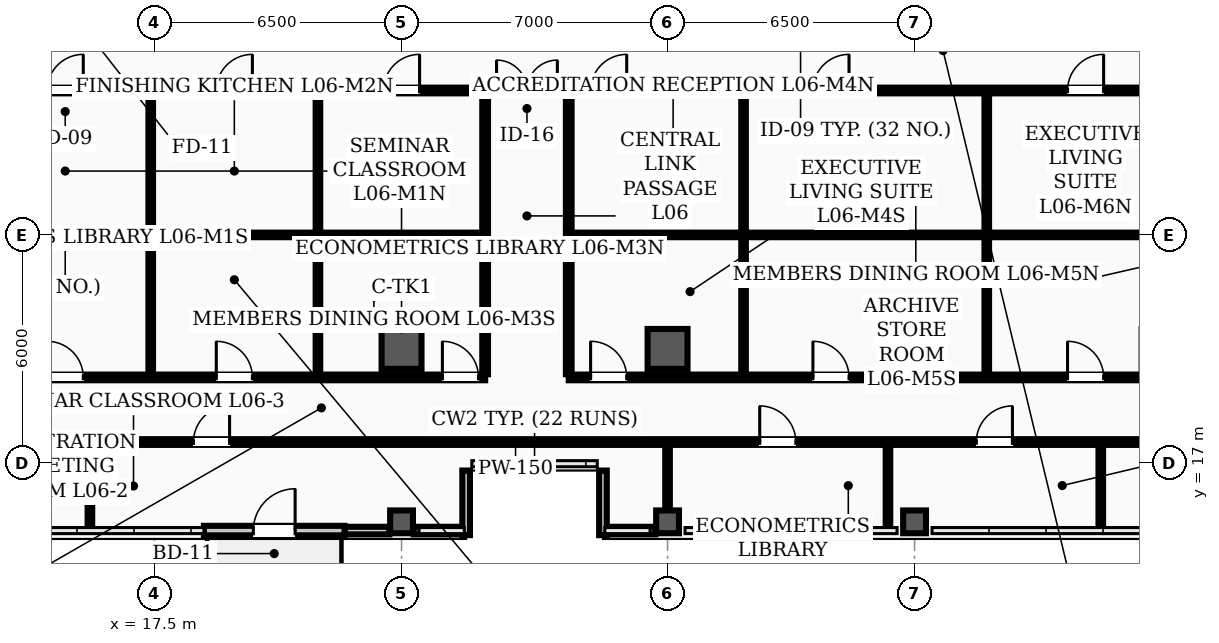
"""IFC4 building model, lengths in metres.
Left out: names, types, materials, properties, quantities, classifications, styles, units other than length and angle.
Written with IfcOpenShell. Run it as: python <this file> out.ifc"""

import sys

from ifc_helpers import new_model, si_unit, direction, frame, frame_2d, origin, origin_2d, place, context, subcontext, project, spatial, rectangle, hollow_rectangle, extrude, element, fill, save


model = new_model("IFC4")
c1 = context("Model", 3, precision=1e-05, world=origin(), true_north=direction((0.0, 1.0)))
c2 = subcontext(c1, "Body", "Model", "MODEL_VIEW")
j1 = project(units=[si_unit("LENGTHUNIT", "METRE"), si_unit("PLANEANGLEUNIT", "RADIAN")], contexts=[c1])
p1 = place(None, origin())
s1 = spatial("IfcSite", under=j1, at=p1, CompositionType="ELEMENT")
p2 = place(p1, origin())
s2 = spatial("IfcBuilding", under=s1, at=p2, CompositionType="ELEMENT")
p3 = place(p2, frame((0.0, 0.0, 26.5)))
s3 = spatial("IfcBuildingStorey", under=s2, at=p3, CompositionType="ELEMENT", Elevation=26.5)
for number, where, z_axis, x_axis in (
    (1, (24.0, 20.0, 0.0), (0.0, 0.0, 1.0), (1.0, 0.0, 0.0)),
    (2, (31.0, 20.0, 0.0), (0.0, 0.0, 1.0), (1.0, 0.0, 0.0)),
    (3, (37.5, 20.0, 0.0), (0.0, 0.0, 1.0), (1.0, 0.0, 0.0)),
):
    element("IfcColumn", number, at=place(p3, frame(where, z_axis=z_axis, x_axis=x_axis)), inside=s3, PredefinedType="COLUMN", context=c2, shape_type="SweptSolid", body=[
        extrude(hollow_rectangle(XDim=1.05, YDim=1.05, WallThickness=0.038, InnerFilletRadius=0.019, OuterFilletRadius=0.057, at=origin_2d()), origin(), (0.0, 0.0, 1.0), 3.9),
    ])
for number, where, z_axis, x_axis in (
    (4, (24.0, 15.45, 0.0), (0.0, 0.0, 1.0), (1.0, 0.0, 0.0)),
    (5, (31.0, 15.45, 0.0), (0.0, 0.0, 1.0), (1.0, 0.0, 0.0)),
    (6, (37.5, 15.45, 0.0), (0.0, 0.0, 1.0), (1.0, 0.0, 0.0)),
):
    element("IfcColumn", number, at=place(p3, frame(where, z_axis=z_axis, x_axis=x_axis)), inside=s3, PredefinedType="COLUMN", context=c2, shape_type="SweptSolid", body=[
        extrude(hollow_rectangle(XDim=0.6, YDim=0.6, WallThickness=0.026, InnerFilletRadius=0.013, OuterFilletRadius=0.039, at=origin_2d()), origin(), (0.0, 0.0, 1.0), 3.9),
    ])
p4 = place(p3, frame((22.5, 15.22, 0.0), z_axis=(0.0, 0.0, 1.0), x_axis=(1.0, 0.0, 0.0)))
e7 = element("IfcWall", 7, at=p4, inside=s3, PredefinedType="PARAPET", context=c2, shape_type="SweptSolid", body=[
    extrude(rectangle(XDim=1.18, YDim=0.2, at=frame_2d((0.59, 0.0))), origin(), (0.0, 0.0, 1.0), 1.2),
])
for number, where, z_axis, x_axis in (
    (8, (24.32, 15.22, 0.0), (0.0, 0.0, 1.0), (1.0, 0.0, 0.0)),
    (9, (29.35, 15.22, 0.0), (0.0, 0.0, 1.0), (1.0, 0.0, 0.0)),
):
    element("IfcWall", number, at=place(p3, frame(where, z_axis=z_axis, x_axis=x_axis)), inside=s3, PredefinedType="PARAPET", context=c2, shape_type="SweptSolid", body=[
        extrude(rectangle(XDim=1.33, YDim=0.2, at=frame_2d((0.665, 0.0))), origin(), (0.0, 0.0, 1.0), 1.2),
    ])
for number, where, z_axis, x_axis in (
    (10, (25.7, 15.1, 0.0), (0.0, 0.0, 1.0), (0.0, 1.0, 0.0)),
    (11, (29.3, 16.8, 0.0), (0.0, 0.0, 1.0), (0.0, -1.0, 0.0)),
):
    element("IfcWall", number, at=place(p3, frame(where, z_axis=z_axis, x_axis=x_axis)), inside=s3, PredefinedType="PARAPET", context=c2, shape_type="SweptSolid", body=[
        extrude(rectangle(XDim=1.7, YDim=0.2, at=frame_2d((0.85, 0.0))), origin(), (0.0, 0.0, 1.0), 1.2),
    ])
p5 = place(p3, frame((18.8, 15.22, 0.0), z_axis=(0.0, 0.0, 1.0), x_axis=(1.0, 0.0, 0.0)))
e12 = element("IfcWall", 12, at=p5, inside=s3, PredefinedType="STANDARD", context=c2, shape_type="SweptSolid", body=[
    extrude(rectangle(XDim=3.7, YDim=0.25, at=frame_2d((1.85, 0.0))), origin(), (0.0, 0.0, 1.0), 3.18),
])
p6 = place(p5, frame((1.3, 0.0, 0.0)))
e13 = element("IfcOpeningElement", 13, at=p6, cuts=e12, PredefinedType="OPENING", context=c2, shape_type="SweptSolid", body=[
    extrude(rectangle(XDim=1.1, YDim=2.2, at=frame_2d((0.55, 1.1))), frame((0.0, 0.135, 0.0), z_axis=(0.0, -1.0, 0.0), x_axis=(1.0, 0.0, 0.0)), (0.0, 0.0, 1.0), 0.27),
])
p7 = place(p3, frame((12.9, 26.8, 0.0), z_axis=(0.0, 0.0, 1.0), x_axis=(1.0, 0.0, 0.0)))
e14 = element("IfcWall", 14, at=p7, inside=s3, PredefinedType="PARTITIONING", context=c2, shape_type="SweptSolid", body=[
    extrude(rectangle(XDim=31.7, YDim=0.15, at=frame_2d((15.85, 0.0))), origin(), (0.0, 0.0, 1.0), 3.1),
])
p8 = place(p7, frame((13.6, 0.0, 0.0)))
e15 = element("IfcOpeningElement", 15, at=p8, cuts=e14, PredefinedType="OPENING", context=c2, shape_type="SweptSolid", body=[
    extrude(rectangle(XDim=1.6, YDim=2.08, at=frame_2d((0.8, 1.04))), frame((0.0, 0.085, 0.0), z_axis=(0.0, -1.0, 0.0), x_axis=(1.0, 0.0, 0.0)), (0.0, 0.0, 1.0), 0.17),
])
p9 = place(p7, frame((1.775, 0.0, 0.0)))
e16 = element("IfcOpeningElement", 16, at=p9, cuts=e14, PredefinedType="OPENING", context=c2, shape_type="SweptSolid", body=[
    extrude(rectangle(XDim=0.95, YDim=2.08, at=frame_2d((0.475, 1.04))), frame((0.0, 0.085, 0.0), z_axis=(0.0, -1.0, 0.0), x_axis=(1.0, 0.0, 0.0)), (0.0, 0.0, 1.0), 0.17),
])
p10 = place(p7, frame((6.225, 0.0, 0.0)))
e17 = element("IfcOpeningElement", 17, at=p10, cuts=e14, PredefinedType="OPENING", context=c2, shape_type="SweptSolid", body=[
    extrude(rectangle(XDim=0.95, YDim=2.08, at=frame_2d((0.475, 1.04))), frame((0.0, 0.085, 0.0), z_axis=(0.0, -1.0, 0.0), x_axis=(1.0, 0.0, 0.0)), (0.0, 0.0, 1.0), 0.17),
])
p11 = place(p7, frame((10.625, 0.0, 0.0)))
e18 = element("IfcOpeningElement", 18, at=p11, cuts=e14, PredefinedType="OPENING", context=c2, shape_type="SweptSolid", body=[
    extrude(rectangle(XDim=0.95, YDim=2.08, at=frame_2d((0.475, 1.04))), frame((0.0, 0.085, 0.0), z_axis=(0.0, -1.0, 0.0), x_axis=(1.0, 0.0, 0.0)), (0.0, 0.0, 1.0), 0.17),
])
p12 = place(p7, frame((16.075, 0.0, 0.0)))
e19 = element("IfcOpeningElement", 19, at=p12, cuts=e14, PredefinedType="OPENING", context=c2, shape_type="SweptSolid", body=[
    extrude(rectangle(XDim=0.95, YDim=2.08, at=frame_2d((0.475, 1.04))), frame((0.0, 0.085, 0.0), z_axis=(0.0, -1.0, 0.0), x_axis=(1.0, 0.0, 0.0)), (0.0, 0.0, 1.0), 0.17),
])
p13 = place(p7, frame((21.925, 0.0, 0.0)))
e20 = element("IfcOpeningElement", 20, at=p13, cuts=e14, PredefinedType="OPENING", context=c2, shape_type="SweptSolid", body=[
    extrude(rectangle(XDim=0.95, YDim=2.08, at=frame_2d((0.475, 1.04))), frame((0.0, 0.085, 0.0), z_axis=(0.0, -1.0, 0.0), x_axis=(1.0, 0.0, 0.0)), (0.0, 0.0, 1.0), 0.17),
])
p14 = place(p7, frame((28.625, 0.0, 0.0)))
e21 = element("IfcOpeningElement", 21, at=p14, cuts=e14, PredefinedType="OPENING", context=c2, shape_type="SweptSolid", body=[
    extrude(rectangle(XDim=0.95, YDim=2.08, at=frame_2d((0.475, 1.04))), frame((0.0, 0.085, 0.0), z_axis=(0.0, -1.0, 0.0), x_axis=(1.0, 0.0, 0.0)), (0.0, 0.0, 1.0), 0.17),
])
p15 = place(p3, frame((4.66, 17.55, 0.0), z_axis=(0.0, 0.0, 1.0), x_axis=(1.0, 0.0, 0.0)))
e22 = element("IfcWall", 22, at=p15, inside=s3, PredefinedType="PARTITIONING", context=c2, shape_type="SweptSolid", body=[
    extrude(rectangle(XDim=44.68, YDim=0.15, at=frame_2d((22.34, 0.0))), origin(), (0.0, 0.0, 1.0), 3.1),
])
p16 = place(p15, frame((6.74, 0.0, 0.0)))
e23 = element("IfcOpeningElement", 23, at=p16, cuts=e22, PredefinedType="OPENING", context=c2, shape_type="SweptSolid", body=[
    extrude(rectangle(XDim=0.95, YDim=2.08, at=frame_2d((0.475, 1.04))), frame((0.0, 0.085, 0.0), z_axis=(0.0, -1.0, 0.0), x_axis=(1.0, 0.0, 0.0)), (0.0, 0.0, 1.0), 0.17),
])
p17 = place(p15, frame((13.865, 0.0, 0.0)))
e24 = element("IfcOpeningElement", 24, at=p17, cuts=e22, PredefinedType="OPENING", context=c2, shape_type="SweptSolid", body=[
    extrude(rectangle(XDim=0.95, YDim=2.08, at=frame_2d((0.475, 1.04))), frame((0.0, 0.085, 0.0), z_axis=(0.0, -1.0, 0.0), x_axis=(1.0, 0.0, 0.0)), (0.0, 0.0, 1.0), 0.17),
])
p18 = place(p15, frame((28.765, 0.0, 0.0)))
e25 = element("IfcOpeningElement", 25, at=p18, cuts=e22, PredefinedType="OPENING", context=c2, shape_type="SweptSolid", body=[
    extrude(rectangle(XDim=0.95, YDim=2.08, at=frame_2d((0.475, 1.04))), frame((0.0, 0.085, 0.0), z_axis=(0.0, -1.0, 0.0), x_axis=(1.0, 0.0, 0.0)), (0.0, 0.0, 1.0), 0.17),
])
p19 = place(p15, frame((34.465, 0.0, 0.0)))
e26 = element("IfcOpeningElement", 26, at=p19, cuts=e22, PredefinedType="OPENING", context=c2, shape_type="SweptSolid", body=[
    extrude(rectangle(XDim=0.95, YDim=2.08, at=frame_2d((0.475, 1.04))), frame((0.0, 0.085, 0.0), z_axis=(0.0, -1.0, 0.0), x_axis=(1.0, 0.0, 0.0)), (0.0, 0.0, 1.0), 0.17),
])
p20 = place(p15, frame((39.24, 0.0, 0.0)))
e27 = element("IfcOpeningElement", 27, at=p20, cuts=e22, PredefinedType="OPENING", context=c2, shape_type="SweptSolid", body=[
    extrude(rectangle(XDim=0.95, YDim=2.08, at=frame_2d((0.475, 1.04))), frame((0.0, 0.085, 0.0), z_axis=(0.0, -1.0, 0.0), x_axis=(1.0, 0.0, 0.0)), (0.0, 0.0, 1.0), 0.17),
])
p21 = place(p3, frame((12.9, 19.25, 0.0), z_axis=(0.0, 0.0, 1.0), x_axis=(1.0, 0.0, 0.0)))
e28 = element("IfcWall", 28, at=p21, inside=s3, PredefinedType="PARTITIONING", context=c2, shape_type="SweptSolid", body=[
    extrude(rectangle(XDim=13.3, YDim=0.15, at=frame_2d((6.65, 0.0))), origin(), (0.0, 0.0, 1.0), 3.1),
])
p22 = place(p21, frame((1.775, 0.0, 0.0)))
e29 = element("IfcOpeningElement", 29, at=p22, cuts=e28, PredefinedType="OPENING", context=c2, shape_type="SweptSolid", body=[
    extrude(rectangle(XDim=0.95, YDim=2.08, at=frame_2d((0.475, 1.04))), frame((0.0, 0.085, 0.0), z_axis=(0.0, -1.0, 0.0), x_axis=(1.0, 0.0, 0.0)), (0.0, 0.0, 1.0), 0.17),
])
p23 = place(p21, frame((6.225, 0.0, 0.0)))
e30 = element("IfcOpeningElement", 30, at=p23, cuts=e28, PredefinedType="OPENING", context=c2, shape_type="SweptSolid", body=[
    extrude(rectangle(XDim=0.95, YDim=2.08, at=frame_2d((0.475, 1.04))), frame((0.0, 0.085, 0.0), z_axis=(0.0, -1.0, 0.0), x_axis=(1.0, 0.0, 0.0)), (0.0, 0.0, 1.0), 0.17),
])
p24 = place(p21, frame((12.175, 0.0, 0.0)))
e31 = element("IfcOpeningElement", 31, at=p24, cuts=e28, PredefinedType="OPENING", context=c2, shape_type="SweptSolid", body=[
    extrude(rectangle(XDim=0.95, YDim=2.08, at=frame_2d((0.475, 1.04))), frame((0.0, 0.085, 0.0), z_axis=(0.0, -1.0, 0.0), x_axis=(1.0, 0.0, 0.0)), (0.0, 0.0, 1.0), 0.17),
])
p25 = place(p3, frame((28.4, 19.25, 0.0), z_axis=(0.0, 0.0, 1.0), x_axis=(1.0, 0.0, 0.0)))
e32 = element("IfcWall", 32, at=p25, inside=s3, PredefinedType="PARTITIONING", context=c2, shape_type="SweptSolid", body=[
    extrude(rectangle(XDim=16.2, YDim=0.15, at=frame_2d((8.1, 0.0))), origin(), (0.0, 0.0, 1.0), 3.1),
])
p26 = place(p25, frame((0.575, 0.0, 0.0)))
e33 = element("IfcOpeningElement", 33, at=p26, cuts=e32, PredefinedType="OPENING", context=c2, shape_type="SweptSolid", body=[
    extrude(rectangle(XDim=0.95, YDim=2.08, at=frame_2d((0.475, 1.04))), frame((0.0, 0.085, 0.0), z_axis=(0.0, -1.0, 0.0), x_axis=(1.0, 0.0, 0.0)), (0.0, 0.0, 1.0), 0.17),
])
p27 = place(p25, frame((6.425, 0.0, 0.0)))
e34 = element("IfcOpeningElement", 34, at=p27, cuts=e32, PredefinedType="OPENING", context=c2, shape_type="SweptSolid", body=[
    extrude(rectangle(XDim=0.95, YDim=2.08, at=frame_2d((0.475, 1.04))), frame((0.0, 0.085, 0.0), z_axis=(0.0, -1.0, 0.0), x_axis=(1.0, 0.0, 0.0)), (0.0, 0.0, 1.0), 0.17),
])
p28 = place(p25, frame((13.125, 0.0, 0.0)))
e35 = element("IfcOpeningElement", 35, at=p28, cuts=e32, PredefinedType="OPENING", context=c2, shape_type="SweptSolid", body=[
    extrude(rectangle(XDim=0.95, YDim=2.08, at=frame_2d((0.475, 1.04))), frame((0.0, 0.085, 0.0), z_axis=(0.0, -1.0, 0.0), x_axis=(1.0, 0.0, 0.0)), (0.0, 0.0, 1.0), 0.17),
])
p29 = place(p3, frame((12.9, 23.0, 0.0), z_axis=(0.0, 0.0, 1.0), x_axis=(1.0, 0.0, 0.0)))
e36 = element("IfcWall", 36, at=p29, inside=s3, PredefinedType="PARTITIONING", context=c2, shape_type="SweptSolid", body=[
    extrude(rectangle(XDim=4.5, YDim=0.12, at=frame_2d((2.25, 0.0))), origin(), (0.0, 0.0, 1.0), 3.1),
])
p30 = place(p3, frame((17.4, 23.0, 0.0), z_axis=(0.0, 0.0, 1.0), x_axis=(1.0, 0.0, 0.0)))
e37 = element("IfcWall", 37, at=p30, inside=s3, PredefinedType="PARTITIONING", context=c2, shape_type="SweptSolid", body=[
    extrude(rectangle(XDim=4.4, YDim=0.12, at=frame_2d((2.2, 0.0))), origin(), (0.0, 0.0, 1.0), 3.3),
])
p31 = place(p3, frame((21.8, 23.0, 0.0), z_axis=(0.0, 0.0, 1.0), x_axis=(1.0, 0.0, 0.0)))
e38 = element("IfcWall", 38, at=p31, inside=s3, PredefinedType="PARTITIONING", context=c2, shape_type="SweptSolid", body=[
    extrude(rectangle(XDim=4.4, YDim=0.12, at=frame_2d((2.2, 0.0))), origin(), (0.0, 0.0, 1.0), 3.1),
])
p32 = place(p3, frame((28.4, 23.0, 0.0), z_axis=(0.0, 0.0, 1.0), x_axis=(1.0, 0.0, 0.0)))
e39 = element("IfcWall", 39, at=p32, inside=s3, PredefinedType="PARTITIONING", context=c2, shape_type="SweptSolid", body=[
    extrude(rectangle(XDim=4.6, YDim=0.12, at=frame_2d((2.3, 0.0))), origin(), (0.0, 0.0, 1.0), 3.1),
])
p33 = place(p3, frame((33.0, 23.0, 0.0), z_axis=(0.0, 0.0, 1.0), x_axis=(1.0, 0.0, 0.0)))
e40 = element("IfcWall", 40, at=p33, inside=s3, PredefinedType="PARTITIONING", context=c2, shape_type="SweptSolid", body=[
    extrude(rectangle(XDim=6.4, YDim=0.12, at=frame_2d((3.2, 0.0))), origin(), (0.0, 0.0, 1.0), 3.1),
])
p34 = place(p3, frame((39.4, 23.0, 0.0), z_axis=(0.0, 0.0, 1.0), x_axis=(1.0, 0.0, 0.0)))
e41 = element("IfcWall", 41, at=p34, inside=s3, PredefinedType="PARTITIONING", context=c2, shape_type="SweptSolid", body=[
    extrude(rectangle(XDim=5.2, YDim=0.12, at=frame_2d((2.6, 0.0))), origin(), (0.0, 0.0, 1.0), 3.1),
])
for number, where, z_axis, x_axis in (
    (42, (26.2, 19.335, 0.0), (0.0, 0.0, 1.0), (0.0, 1.0, 0.0)),
    (43, (28.4, 19.335, 0.0), (0.0, 0.0, 1.0), (0.0, 1.0, 0.0)),
):
    element("IfcWall", number, at=place(p3, frame(where, z_axis=z_axis, x_axis=x_axis)), inside=s3, PredefinedType="PARTITIONING", context=c2, shape_type="SweptSolid", body=[
        extrude(rectangle(XDim=7.38, YDim=0.15, at=frame_2d((3.69, 0.0))), origin(), (0.0, 0.0, 1.0), 3.0),
    ])
p35 = place(p3, frame((15.8, 15.31, 0.0), z_axis=(0.0, 0.0, 1.0), x_axis=(0.0, 1.0, 0.0)))
e44 = element("IfcWall", 44, at=p35, inside=s3, PredefinedType="PARTITIONING", context=c2, shape_type="SweptSolid", body=[
    extrude(rectangle(XDim=2.155, YDim=0.12, at=frame_2d((1.078, 0.0))), origin(), (0.0, 0.0, 1.0), 3.212),
])
p36 = place(p3, frame((31.0, 15.31, 0.0), z_axis=(0.0, 0.0, 1.0), x_axis=(0.0, 1.0, 0.0)))
e45 = element("IfcWall", 45, at=p36, inside=s3, PredefinedType="PARTITIONING", context=c2, shape_type="SweptSolid", body=[
    extrude(rectangle(XDim=2.155, YDim=0.12, at=frame_2d((1.078, 0.0))), origin(), (0.0, 0.0, 1.0), 3.1),
])
for number, where, z_axis, x_axis in (
    (46, (36.8, 15.31, 0.0), (0.0, 0.0, 1.0), (0.0, 1.0, 0.0)),
    (47, (42.4, 15.31, 0.0), (0.0, 0.0, 1.0), (0.0, 1.0, 0.0)),
):
    element("IfcWall", number, at=place(p3, frame(where, z_axis=z_axis, x_axis=x_axis)), inside=s3, PredefinedType="PARTITIONING", context=c2, shape_type="SweptSolid", body=[
        extrude(rectangle(XDim=2.155, YDim=0.12, at=frame_2d((1.078, 0.0))), origin(), (0.0, 0.0, 1.0), 3.212),
    ])
for number, where, z_axis, x_axis in (
    (48, (17.4, 19.335, 0.0), (0.0, 0.0, 1.0), (0.0, 1.0, 0.0)),
    (49, (21.8, 19.335, 0.0), (0.0, 0.0, 1.0), (0.0, 1.0, 0.0)),
    (50, (33.0, 19.335, 0.0), (0.0, 0.0, 1.0), (0.0, 1.0, 0.0)),
    (51, (39.4, 19.335, 0.0), (0.0, 0.0, 1.0), (0.0, 1.0, 0.0)),
):
    element("IfcWall", number, at=place(p3, frame(where, z_axis=z_axis, x_axis=x_axis)), inside=s3, PredefinedType="PARTITIONING", context=c2, shape_type="SweptSolid", body=[
        extrude(rectangle(XDim=7.38, YDim=0.12, at=frame_2d((3.69, 0.0))), origin(), (0.0, 0.0, 1.0), 3.0),
    ])
p37 = place(p6, origin())
e52 = element("IfcDoor", 52, at=p37, inside=s3, OperationType="SINGLE_SWING_RIGHT", PredefinedType="DOOR", context=c2, shape_type="SweptSolid", body=[
    extrude(rectangle(XDim=1.1, YDim=2.2, at=frame_2d((0.55, 1.1))), frame((0.0, 0.025, 0.0), z_axis=(0.0, -1.0, 0.0), x_axis=(1.0, 0.0, 0.0)), (0.0, 0.0, 1.0), 0.05),
])
fill(e13, e52)
p38 = place(p8, origin())
e53 = element("IfcDoor", 53, at=p38, inside=s3, OperationType="DOUBLE_DOOR_SINGLE_SWING", PredefinedType="DOOR", context=c2, shape_type="SweptSolid", body=[
    extrude(rectangle(XDim=1.6, YDim=2.08, at=frame_2d((0.8, 1.04))), frame((0.0, 0.025, 0.0), z_axis=(0.0, -1.0, 0.0), x_axis=(1.0, 0.0, 0.0)), (0.0, 0.0, 1.0), 0.05),
])
fill(e15, e53)
p39 = place(p17, origin())
e54 = element("IfcDoor", 54, at=p39, inside=s3, OperationType="SINGLE_SWING_RIGHT", PredefinedType="DOOR", context=c2, shape_type="SweptSolid", body=[
    extrude(rectangle(XDim=0.95, YDim=2.08, at=frame_2d((0.475, 1.04))), frame((0.0, 0.025, 0.0), z_axis=(0.0, -1.0, 0.0), x_axis=(1.0, 0.0, 0.0)), (0.0, 0.0, 1.0), 0.05),
])
fill(e24, e54)
p40 = place(p18, origin())
e55 = element("IfcDoor", 55, at=p40, inside=s3, OperationType="SINGLE_SWING_LEFT", PredefinedType="DOOR", context=c2, shape_type="SweptSolid", body=[
    extrude(rectangle(XDim=0.95, YDim=2.08, at=frame_2d((0.475, 1.04))), frame((0.0, 0.025, 0.0), z_axis=(0.0, -1.0, 0.0), x_axis=(1.0, 0.0, 0.0)), (0.0, 0.0, 1.0), 0.05),
])
fill(e25, e55)
p41 = place(p19, origin())
e56 = element("IfcDoor", 56, at=p41, inside=s3, OperationType="SINGLE_SWING_RIGHT", PredefinedType="DOOR", context=c2, shape_type="SweptSolid", body=[
    extrude(rectangle(XDim=0.95, YDim=2.08, at=frame_2d((0.475, 1.04))), frame((0.0, 0.025, 0.0), z_axis=(0.0, -1.0, 0.0), x_axis=(1.0, 0.0, 0.0)), (0.0, 0.0, 1.0), 0.05),
])
fill(e26, e56)
p42 = place(p9, origin())
e57 = element("IfcDoor", 57, at=p42, inside=s3, OperationType="SINGLE_SWING_RIGHT", PredefinedType="DOOR", context=c2, shape_type="SweptSolid", body=[
    extrude(rectangle(XDim=0.95, YDim=2.08, at=frame_2d((0.475, 1.04))), frame((0.0, 0.025, 0.0), z_axis=(0.0, -1.0, 0.0), x_axis=(1.0, 0.0, 0.0)), (0.0, 0.0, 1.0), 0.05),
])
fill(e16, e57)
p43 = place(p22, origin())
e58 = element("IfcDoor", 58, at=p43, inside=s3, OperationType="SINGLE_SWING_LEFT", PredefinedType="DOOR", context=c2, shape_type="SweptSolid", body=[
    extrude(rectangle(XDim=0.95, YDim=2.08, at=frame_2d((0.475, 1.04))), frame((0.0, 0.025, 0.0), z_axis=(0.0, -1.0, 0.0), x_axis=(1.0, 0.0, 0.0)), (0.0, 0.0, 1.0), 0.05),
])
fill(e29, e58)
p44 = place(p10, origin())
e59 = element("IfcDoor", 59, at=p44, inside=s3, OperationType="SINGLE_SWING_RIGHT", PredefinedType="DOOR", context=c2, shape_type="SweptSolid", body=[
    extrude(rectangle(XDim=0.95, YDim=2.08, at=frame_2d((0.475, 1.04))), frame((0.0, 0.025, 0.0), z_axis=(0.0, -1.0, 0.0), x_axis=(1.0, 0.0, 0.0)), (0.0, 0.0, 1.0), 0.05),
])
fill(e17, e59)
p45 = place(p23, origin())
e60 = element("IfcDoor", 60, at=p45, inside=s3, OperationType="SINGLE_SWING_LEFT", PredefinedType="DOOR", context=c2, shape_type="SweptSolid", body=[
    extrude(rectangle(XDim=0.95, YDim=2.08, at=frame_2d((0.475, 1.04))), frame((0.0, 0.025, 0.0), z_axis=(0.0, -1.0, 0.0), x_axis=(1.0, 0.0, 0.0)), (0.0, 0.0, 1.0), 0.05),
])
fill(e30, e60)
p46 = place(p11, origin())
e61 = element("IfcDoor", 61, at=p46, inside=s3, OperationType="SINGLE_SWING_RIGHT", PredefinedType="DOOR", context=c2, shape_type="SweptSolid", body=[
    extrude(rectangle(XDim=0.95, YDim=2.08, at=frame_2d((0.475, 1.04))), frame((0.0, 0.025, 0.0), z_axis=(0.0, -1.0, 0.0), x_axis=(1.0, 0.0, 0.0)), (0.0, 0.0, 1.0), 0.05),
])
fill(e18, e61)
p47 = place(p24, origin())
e62 = element("IfcDoor", 62, at=p47, inside=s3, OperationType="SINGLE_SWING_LEFT", PredefinedType="DOOR", context=c2, shape_type="SweptSolid", body=[
    extrude(rectangle(XDim=0.95, YDim=2.08, at=frame_2d((0.475, 1.04))), frame((0.0, 0.025, 0.0), z_axis=(0.0, -1.0, 0.0), x_axis=(1.0, 0.0, 0.0)), (0.0, 0.0, 1.0), 0.05),
])
fill(e31, e62)
p48 = place(p12, origin())
e63 = element("IfcDoor", 63, at=p48, inside=s3, OperationType="SINGLE_SWING_RIGHT", PredefinedType="DOOR", context=c2, shape_type="SweptSolid", body=[
    extrude(rectangle(XDim=0.95, YDim=2.08, at=frame_2d((0.475, 1.04))), frame((0.0, 0.025, 0.0), z_axis=(0.0, -1.0, 0.0), x_axis=(1.0, 0.0, 0.0)), (0.0, 0.0, 1.0), 0.05),
])
fill(e19, e63)
p49 = place(p26, origin())
e64 = element("IfcDoor", 64, at=p49, inside=s3, OperationType="SINGLE_SWING_LEFT", PredefinedType="DOOR", context=c2, shape_type="SweptSolid", body=[
    extrude(rectangle(XDim=0.95, YDim=2.08, at=frame_2d((0.475, 1.04))), frame((0.0, 0.025, 0.0), z_axis=(0.0, -1.0, 0.0), x_axis=(1.0, 0.0, 0.0)), (0.0, 0.0, 1.0), 0.05),
])
fill(e33, e64)
p50 = place(p13, origin())
e65 = element("IfcDoor", 65, at=p50, inside=s3, OperationType="SINGLE_SWING_RIGHT", PredefinedType="DOOR", context=c2, shape_type="SweptSolid", body=[
    extrude(rectangle(XDim=0.95, YDim=2.08, at=frame_2d((0.475, 1.04))), frame((0.0, 0.025, 0.0), z_axis=(0.0, -1.0, 0.0), x_axis=(1.0, 0.0, 0.0)), (0.0, 0.0, 1.0), 0.05),
])
fill(e20, e65)
p51 = place(p27, origin())
e66 = element("IfcDoor", 66, at=p51, inside=s3, OperationType="SINGLE_SWING_LEFT", PredefinedType="DOOR", context=c2, shape_type="SweptSolid", body=[
    extrude(rectangle(XDim=0.95, YDim=2.08, at=frame_2d((0.475, 1.04))), frame((0.0, 0.025, 0.0), z_axis=(0.0, -1.0, 0.0), x_axis=(1.0, 0.0, 0.0)), (0.0, 0.0, 1.0), 0.05),
])
fill(e34, e66)
p52 = place(p14, origin())
e67 = element("IfcDoor", 67, at=p52, inside=s3, OperationType="SINGLE_SWING_RIGHT", PredefinedType="DOOR", context=c2, shape_type="SweptSolid", body=[
    extrude(rectangle(XDim=0.95, YDim=2.08, at=frame_2d((0.475, 1.04))), frame((0.0, 0.025, 0.0), z_axis=(0.0, -1.0, 0.0), x_axis=(1.0, 0.0, 0.0)), (0.0, 0.0, 1.0), 0.05),
])
fill(e21, e67)
p53 = place(p28, origin())
e68 = element("IfcDoor", 68, at=p53, inside=s3, OperationType="SINGLE_SWING_LEFT", PredefinedType="DOOR", context=c2, shape_type="SweptSolid", body=[
    extrude(rectangle(XDim=0.95, YDim=2.08, at=frame_2d((0.475, 1.04))), frame((0.0, 0.025, 0.0), z_axis=(0.0, -1.0, 0.0), x_axis=(1.0, 0.0, 0.0)), (0.0, 0.0, 1.0), 0.05),
])
fill(e35, e68)
save(model, sys.argv[1])
